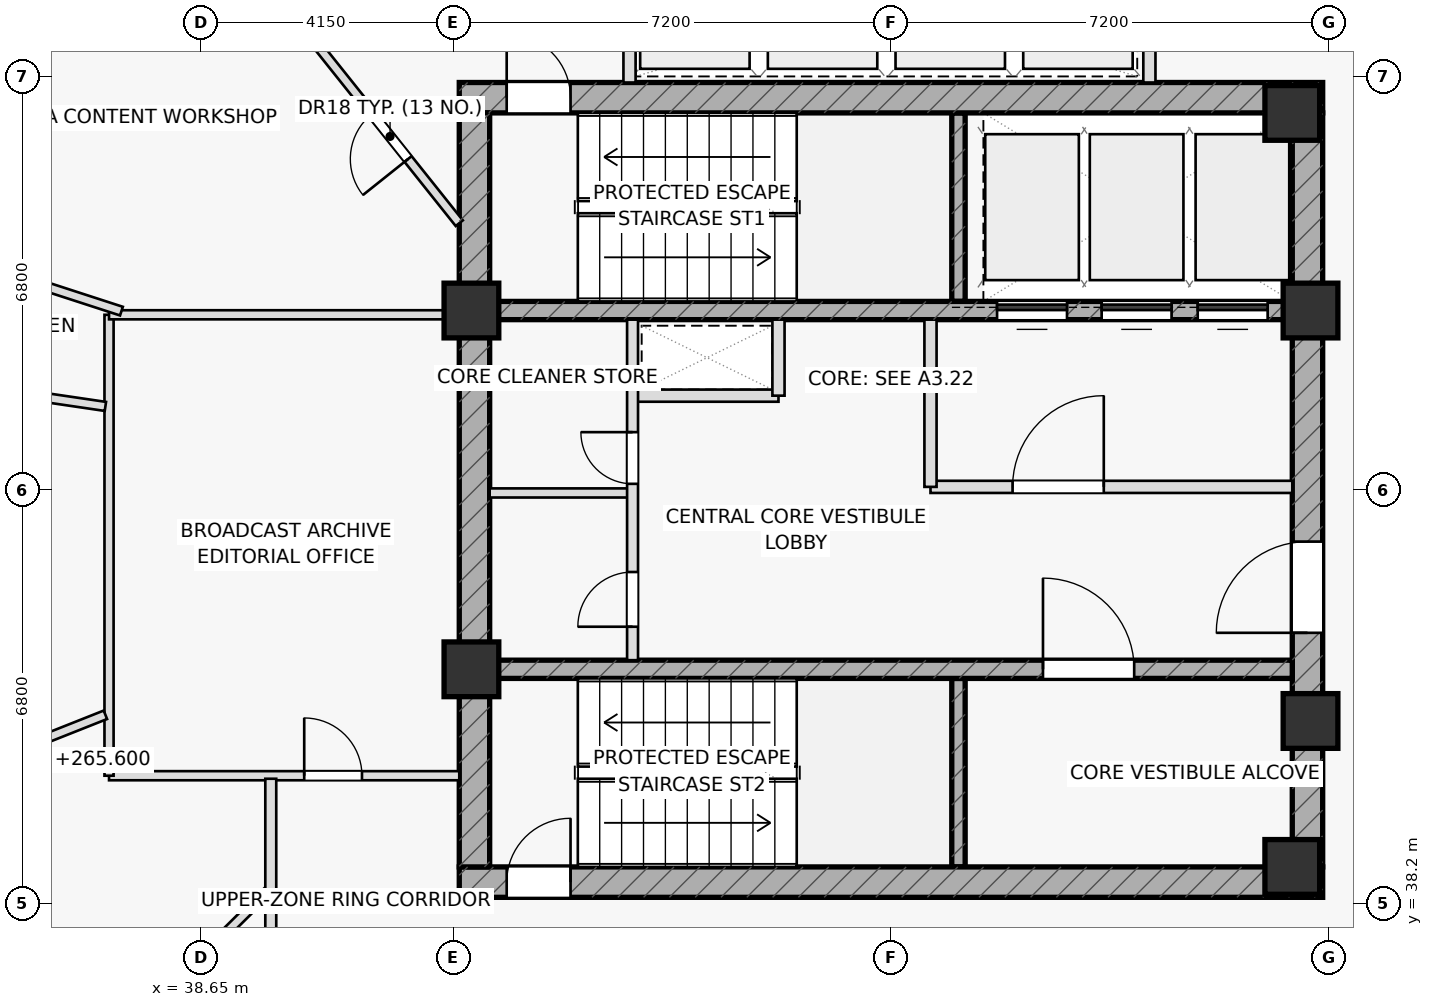
"""IFC4 building model, lengths in metres.
Left out: names, types, materials, properties, quantities, classifications, styles, units other than length and angle.
Written with IfcOpenShell. Run it as: python <this file> out.ifc"""

import sys

from ifc_helpers import new_model, si_unit, direction, frame, frame_2d, origin, origin_2d, place, context, subcontext, project, spatial, rectangle, extrude, element, fill, save


model = new_model("IFC4")
c1 = context("Model", 3, precision=1e-05, world=origin(), true_north=direction((0.0, 1.0)))
c2 = subcontext(c1, "Body", "Model", "MODEL_VIEW")
j1 = project(units=[si_unit("LENGTHUNIT", "METRE"), si_unit("PLANEANGLEUNIT", "RADIAN")], contexts=[c1])
p1 = place(None, origin())
s1 = spatial("IfcSite", under=j1, at=p1, CompositionType="ELEMENT")
p2 = place(p1, origin())
s2 = spatial("IfcBuilding", under=s1, at=p2, CompositionType="ELEMENT")
p3 = place(p2, frame((0.0, 0.0, 265.6)))
s3 = spatial("IfcBuildingStorey", under=s2, at=p3, CompositionType="ELEMENT", Elevation=265.6)
for number, where, z_axis, x_axis in (
    (1, (51.11, 48.1, 0.0), (0.0, 0.0, 1.0), (0.0, 1.0, 0.0)),
    (2, (51.11, 38.8, 0.0), (0.0, 0.0, 1.0), (0.0, 1.0, 0.0)),
):
    element("IfcWall", number, at=place(p3, frame(where, z_axis=z_axis, x_axis=x_axis)), inside=s3, PredefinedType="SHEAR", context=c2, shape_type="SweptSolid", body=[
        extrude(rectangle(XDim=3.1, YDim=0.22, at=frame_2d((1.55, 0.0))), origin(), (0.0, 0.0, 1.0), 3.65),
    ])
p4 = place(p3, frame((42.9, 51.45, 0.0), z_axis=(0.0, 0.0, 1.0), x_axis=(1.0, 0.0, 0.0)))
e3 = element("IfcWall", 3, at=p4, inside=s3, PredefinedType="SHEAR", context=c2, shape_type="SweptSolid", body=[
    extrude(rectangle(XDim=14.2, YDim=0.5, at=frame_2d((7.1, 0.0))), origin(), (0.0, 0.0, 1.0), 3.65),
])
p5 = place(p4, frame((0.78, 0.0, 0.0)))
e4 = element("IfcOpeningElement", 4, at=p5, cuts=e3, PredefinedType="OPENING", context=c2, shape_type="SweptSolid", body=[
    extrude(rectangle(XDim=1.05, YDim=2.2, at=frame_2d((0.525, 1.1))), frame((0.0, 0.26, 0.0), z_axis=(0.0, -1.0, 0.0), x_axis=(1.0, 0.0, 0.0)), (0.0, 0.0, 1.0), 0.52),
])
p6 = place(p3, frame((42.9, 38.55, 0.0), z_axis=(0.0, 0.0, 1.0), x_axis=(1.0, 0.0, 0.0)))
e5 = element("IfcWall", 5, at=p6, inside=s3, PredefinedType="SHEAR", context=c2, shape_type="SweptSolid", body=[
    extrude(rectangle(XDim=14.2, YDim=0.5, at=frame_2d((7.1, 0.0))), origin(), (0.0, 0.0, 1.0), 3.65),
])
p7 = place(p6, frame((0.78, 0.0, 0.0)))
e6 = element("IfcOpeningElement", 6, at=p7, cuts=e5, PredefinedType="OPENING", context=c2, shape_type="SweptSolid", body=[
    extrude(rectangle(XDim=1.05, YDim=2.2, at=frame_2d((0.525, 1.1))), frame((0.0, 0.26, 0.0), z_axis=(0.0, -1.0, 0.0), x_axis=(1.0, 0.0, 0.0)), (0.0, 0.0, 1.0), 0.52),
])
p8 = place(p3, frame((43.15, 38.8, 0.0), z_axis=(0.0, 0.0, 1.0), x_axis=(0.0, 1.0, 0.0)))
e7 = element("IfcWall", 7, at=p8, inside=s3, PredefinedType="SHEAR", context=c2, shape_type="SweptSolid", body=[
    extrude(rectangle(XDim=12.4, YDim=0.5, at=frame_2d((6.2, 0.0))), origin(), (0.0, 0.0, 1.0), 3.65),
])
p9 = place(p3, frame((56.85, 38.8, 0.0), z_axis=(0.0, 0.0, 1.0), x_axis=(0.0, 1.0, 0.0)))
e8 = element("IfcWall", 8, at=p9, inside=s3, PredefinedType="SHEAR", context=c2, shape_type="SweptSolid", body=[
    extrude(rectangle(XDim=12.4, YDim=0.5, at=frame_2d((6.2, 0.0))), origin(), (0.0, 0.0, 1.0), 3.65),
])
p10 = place(p9, frame((3.85, 0.0, 0.0)))
e9 = element("IfcOpeningElement", 9, at=p10, cuts=e8, PredefinedType="OPENING", context=c2, shape_type="SweptSolid", body=[
    extrude(rectangle(XDim=1.5, YDim=2.2, at=frame_2d((0.75, 1.1))), frame((0.0, 0.26, 0.0), z_axis=(0.0, -1.0, 0.0), x_axis=(1.0, 0.0, 0.0)), (0.0, 0.0, 1.0), 0.52),
])
p11 = place(p3, frame((43.4, 47.95, 0.0), z_axis=(0.0, 0.0, 1.0), x_axis=(1.0, 0.0, 0.0)))
e10 = element("IfcWall", 10, at=p11, inside=s3, PredefinedType="SHEAR", context=c2, shape_type="SweptSolid", body=[
    extrude(rectangle(XDim=13.2, YDim=0.3, at=frame_2d((6.6, 0.0))), origin(), (0.0, 0.0, 1.0), 3.65),
])
p12 = place(p11, frame((8.345, 0.0, 0.0)))
e11 = element("IfcOpeningElement", 11, at=p12, cuts=e10, PredefinedType="OPENING", context=c2, shape_type="SweptSolid", body=[
    extrude(rectangle(XDim=1.15, YDim=2.2, at=frame_2d((0.575, 1.1))), frame((0.0, 0.16, 0.0), z_axis=(0.0, -1.0, 0.0), x_axis=(1.0, 0.0, 0.0)), (0.0, 0.0, 1.0), 0.32),
])
p13 = place(p11, frame((10.065, 0.0, 0.0)))
e12 = element("IfcOpeningElement", 12, at=p13, cuts=e10, PredefinedType="OPENING", context=c2, shape_type="SweptSolid", body=[
    extrude(rectangle(XDim=1.15, YDim=2.2, at=frame_2d((0.575, 1.1))), frame((0.0, 0.16, 0.0), z_axis=(0.0, -1.0, 0.0), x_axis=(1.0, 0.0, 0.0)), (0.0, 0.0, 1.0), 0.32),
])
p14 = place(p11, frame((11.645, 0.0, 0.0)))
e13 = element("IfcOpeningElement", 13, at=p14, cuts=e10, PredefinedType="OPENING", context=c2, shape_type="SweptSolid", body=[
    extrude(rectangle(XDim=1.15, YDim=2.2, at=frame_2d((0.575, 1.1))), frame((0.0, 0.16, 0.0), z_axis=(0.0, -1.0, 0.0), x_axis=(1.0, 0.0, 0.0)), (0.0, 0.0, 1.0), 0.32),
])
p15 = place(p3, frame((43.4, 42.05, 0.0), z_axis=(0.0, 0.0, 1.0), x_axis=(1.0, 0.0, 0.0)))
e14 = element("IfcWall", 14, at=p15, inside=s3, PredefinedType="SHEAR", context=c2, shape_type="SweptSolid", body=[
    extrude(rectangle(XDim=13.2, YDim=0.3, at=frame_2d((6.6, 0.0))), origin(), (0.0, 0.0, 1.0), 3.65),
])
p16 = place(p15, frame((9.1, 0.0, 0.0)))
e15 = element("IfcOpeningElement", 15, at=p16, cuts=e14, PredefinedType="OPENING", context=c2, shape_type="SweptSolid", body=[
    extrude(rectangle(XDim=1.5, YDim=2.2, at=frame_2d((0.75, 1.1))), frame((0.0, 0.16, 0.0), z_axis=(0.0, -1.0, 0.0), x_axis=(1.0, 0.0, 0.0)), (0.0, 0.0, 1.0), 0.32),
])
for number, where, z_axis, x_axis in (
    (16, (43.1, 47.95, 0.0), (0.0, 0.0, 1.0), (1.0, 0.0, 0.0)),
    (17, (56.9, 47.95, 0.0), (0.0, 0.0, 1.0), (1.0, 0.0, 0.0)),
    (18, (56.6, 51.2, 0.0), (0.0, 0.0, 1.0), (1.0, 0.0, 0.0)),
    (19, (43.1, 42.05, 0.0), (0.0, 0.0, 1.0), (1.0, 0.0, 0.0)),
    (20, (56.9, 41.2, 0.0), (0.0, 0.0, 1.0), (1.0, 0.0, 0.0)),
    (21, (56.6, 38.8, 0.0), (0.0, 0.0, 1.0), (1.0, 0.0, 0.0)),
):
    element("IfcColumn", number, at=place(p3, frame(where, z_axis=z_axis, x_axis=x_axis)), inside=s3, PredefinedType="COLUMN", context=c2, shape_type="SweptSolid", body=[
        extrude(rectangle(XDim=0.9, YDim=0.9, at=origin_2d()), origin(), (0.0, 0.0, 1.0), 3.65),
    ])
for number, where, z_axis, x_axis in (
    (22, (45.7, 51.7, 0.0), (0.0, 0.0, 1.0), (0.0, 1.0, 0.0)),
    (23, (54.25, 51.7, 0.0), (0.0, 0.0, 1.0), (0.0, 1.0, 0.0)),
):
    element("IfcWall", number, at=place(p3, frame(where, z_axis=z_axis, x_axis=x_axis)), inside=s3, PredefinedType="PARTITIONING", context=c2, shape_type="SweptSolid", body=[
        extrude(rectangle(XDim=2.6, YDim=0.2, at=frame_2d((1.3, 0.0))), origin(), (0.0, 0.0, 1.0), 3.65),
    ])
p17 = place(p3, frame((45.75, 46.55, 0.0), z_axis=(0.0, 0.0, 1.0), x_axis=(1.0, 0.0, 0.0)))
e24 = element("IfcWall", 24, at=p17, inside=s3, PredefinedType="PARTITIONING", context=c2, shape_type="SweptSolid", body=[
    extrude(rectangle(XDim=2.4, YDim=0.2, at=frame_2d((1.2, 0.0))), origin(), (0.0, 0.0, 1.0), 3.65),
])
p18 = place(p3, frame((48.15, 46.55, 0.0), z_axis=(0.0, 0.0, 1.0), x_axis=(0.0, 1.0, 0.0)))
e25 = element("IfcWall", 25, at=p18, inside=s3, PredefinedType="PARTITIONING", context=c2, shape_type="SweptSolid", body=[
    extrude(rectangle(XDim=1.25, YDim=0.2, at=frame_2d((0.625, 0.0))), origin(), (0.0, 0.0, 1.0), 3.65),
])
p19 = place(p3, frame((50.65, 45.05, 0.0), z_axis=(0.0, 0.0, 1.0), x_axis=(1.0, 0.0, 0.0)))
e26 = element("IfcWall", 26, at=p19, inside=s3, PredefinedType="PARTITIONING", context=c2, shape_type="SweptSolid", body=[
    extrude(rectangle(XDim=5.95, YDim=0.2, at=frame_2d((2.975, 0.0))), origin(), (0.0, 0.0, 1.0), 3.65),
])
p20 = place(p19, frame((1.35, 0.0, 0.0)))
e27 = element("IfcOpeningElement", 27, at=p20, cuts=e26, PredefinedType="OPENING", context=c2, shape_type="SweptSolid", body=[
    extrude(rectangle(XDim=1.5, YDim=2.2, at=frame_2d((0.75, 1.1))), frame((0.0, 0.11, 0.0), z_axis=(0.0, -1.0, 0.0), x_axis=(1.0, 0.0, 0.0)), (0.0, 0.0, 1.0), 0.22),
])
p21 = place(p3, frame((50.65, 45.05, 0.0), z_axis=(0.0, 0.0, 1.0), x_axis=(0.0, 1.0, 0.0)))
e28 = element("IfcWall", 28, at=p21, inside=s3, PredefinedType="PARTITIONING", context=c2, shape_type="SweptSolid", body=[
    extrude(rectangle(XDim=2.75, YDim=0.2, at=frame_2d((1.375, 0.0))), origin(), (0.0, 0.0, 1.0), 3.65),
])
p22 = place(p3, frame((43.4, 44.95, 0.0), z_axis=(0.0, 0.0, 1.0), x_axis=(1.0, 0.0, 0.0)))
e29 = element("IfcWall", 29, at=p22, inside=s3, PredefinedType="PARTITIONING", context=c2, shape_type="SweptSolid", body=[
    extrude(rectangle(XDim=2.35, YDim=0.15, at=frame_2d((1.175, 0.0))), origin(), (0.0, 0.0, 1.0), 3.65),
])
p23 = place(p3, frame((45.75, 42.2, 0.0), z_axis=(0.0, 0.0, 1.0), x_axis=(0.0, 1.0, 0.0)))
e30 = element("IfcWall", 30, at=p23, inside=s3, PredefinedType="PARTITIONING", context=c2, shape_type="SweptSolid", body=[
    extrude(rectangle(XDim=5.6, YDim=0.18, at=frame_2d((2.8, 0.0))), origin(), (0.0, 0.0, 1.0), 3.65),
])
p24 = place(p23, frame((0.55, 0.0, 0.0)))
e31 = element("IfcOpeningElement", 31, at=p24, cuts=e30, PredefinedType="OPENING", context=c2, shape_type="SweptSolid", body=[
    extrude(rectangle(XDim=0.9, YDim=2.05, at=frame_2d((0.45, 1.025))), frame((0.0, 0.1, 0.0), z_axis=(0.0, -1.0, 0.0), x_axis=(1.0, 0.0, 0.0)), (0.0, 0.0, 1.0), 0.2),
])
p25 = place(p23, frame((2.9, 0.0, 0.0)))
e32 = element("IfcOpeningElement", 32, at=p25, cuts=e30, PredefinedType="OPENING", context=c2, shape_type="SweptSolid", body=[
    extrude(rectangle(XDim=0.85, YDim=2.05, at=frame_2d((0.425, 1.025))), frame((0.0, 0.1, 0.0), z_axis=(0.0, -1.0, 0.0), x_axis=(1.0, 0.0, 0.0)), (0.0, 0.0, 1.0), 0.2),
])
p26 = place(p3, frame((37.14, 40.3, 0.0), z_axis=(0.0, 0.0, 1.0), x_axis=(1.0, 0.0, 0.0)))
e33 = element("IfcWall", 33, at=p26, inside=s3, PredefinedType="PARTITIONING", context=c2, shape_type="SweptSolid", body=[
    extrude(rectangle(XDim=5.76, YDim=0.15, at=frame_2d((2.88, 0.0))), origin(), (0.0, 0.0, 1.0), 3.075),
])
p27 = place(p26, frame((3.21, 0.0, 0.0)))
e34 = element("IfcOpeningElement", 34, at=p27, cuts=e33, PredefinedType="OPENING", context=c2, shape_type="SweptSolid", body=[
    extrude(rectangle(XDim=0.95, YDim=2.05, at=frame_2d((0.475, 1.025))), frame((0.0, 0.085, 0.0), z_axis=(0.0, -1.0, 0.0), x_axis=(1.0, 0.0, 0.0)), (0.0, 0.0, 1.0), 0.17),
])
p28 = place(p3, frame((37.14, 40.3, 0.0), z_axis=(0.0, 0.0, 1.0), x_axis=(0.0, 1.0, 0.0)))
e35 = element("IfcWall", 35, at=p28, inside=s3, PredefinedType="PARTITIONING", context=c2, shape_type="SweptSolid", body=[
    extrude(rectangle(XDim=7.58, YDim=0.15, at=frame_2d((3.79, 0.0))), origin(), (0.0, 0.0, 1.0), 3.65),
])
p29 = place(p3, frame((37.14, 47.88, 0.0), z_axis=(0.0, 0.0, 1.0), x_axis=(1.0, 0.0, 0.0)))
e36 = element("IfcWall", 36, at=p29, inside=s3, PredefinedType="PARTITIONING", context=c2, shape_type="SweptSolid", body=[
    extrude(rectangle(XDim=5.76, YDim=0.15, at=frame_2d((2.88, 0.0))), origin(), (0.0, 0.0, 1.0), 3.075),
])
p30 = place(p3, frame((42.9, 49.386, 0.0), z_axis=(0.0, 0.0, 1.0), x_axis=(-0.623691664513, 0.781670459731, 0.0)))
e37 = element("IfcWall", 37, at=p30, inside=s3, PredefinedType="PARTITIONING", context=c2, shape_type="SweptSolid", body=[
    extrude(rectangle(XDim=17.902, YDim=0.15, at=frame_2d((8.951, 0.0))), origin(), (0.0, 0.0, 1.0), 3.075),
])
p31 = place(p30, frame((1.35, 0.0, 0.0)))
e38 = element("IfcOpeningElement", 38, at=p31, cuts=e37, PredefinedType="OPENING", context=c2, shape_type="SweptSolid", body=[
    extrude(rectangle(XDim=0.95, YDim=2.05, at=frame_2d((0.475, 1.025))), frame((0.0, 0.085, 0.0), z_axis=(0.0, -1.0, 0.0), x_axis=(1.0, 0.0, 0.0)), (0.0, 0.0, 1.0), 0.17),
])
p32 = place(p3, frame((37.344, 47.94, 0.0), z_axis=(0.0, 0.0, 1.0), x_axis=(-0.951128986238, 0.30879386577, 0.0)))
e39 = element("IfcWall", 39, at=p32, inside=s3, PredefinedType="PARTITIONING", context=c2, shape_type="SweptSolid", body=[
    extrude(rectangle(XDim=13.131, YDim=0.15, at=frame_2d((6.565, 0.0))), origin(), (0.0, 0.0, 1.0), 3.175),
])
p33 = place(p3, frame((37.08, 46.373, 0.0), z_axis=(0.0, 0.0, 1.0), x_axis=(-0.989323166156, 0.145738371431, 0.0)))
e40 = element("IfcWall", 40, at=p33, inside=s3, PredefinedType="PARTITIONING", context=c2, shape_type="SweptSolid", body=[
    extrude(rectangle(XDim=11.619, YDim=0.15, at=frame_2d((5.81, 0.0))), origin(), (0.0, 0.0, 1.0), 3.075),
])
p34 = place(p33, frame((3.15, 0.0, 0.0)))
e41 = element("IfcOpeningElement", 41, at=p34, cuts=e40, PredefinedType="OPENING", context=c2, shape_type="SweptSolid", body=[
    extrude(rectangle(XDim=0.95, YDim=2.05, at=frame_2d((0.475, 1.025))), frame((0.0, 0.085, 0.0), z_axis=(0.0, -1.0, 0.0), x_axis=(1.0, 0.0, 0.0)), (0.0, 0.0, 1.0), 0.17),
])
p35 = place(p3, frame((37.08, 41.302, 0.0), z_axis=(0.0, 0.0, 1.0), x_axis=(-0.929502291, -0.368816337797, 0.0)))
e42 = element("IfcWall", 42, at=p35, inside=s3, PredefinedType="PARTITIONING", context=c2, shape_type="SweptSolid", body=[
    extrude(rectangle(XDim=9.063, YDim=0.15, at=frame_2d((4.532, 0.0))), origin(), (0.0, 0.0, 1.0), 3.075),
])
p36 = place(p35, frame((2.55, 0.0, 0.0)))
e43 = element("IfcOpeningElement", 43, at=p36, cuts=e42, PredefinedType="OPENING", context=c2, shape_type="SweptSolid", body=[
    extrude(rectangle(XDim=0.95, YDim=2.05, at=frame_2d((0.475, 1.025))), frame((0.0, 0.085, 0.0), z_axis=(0.0, -1.0, 0.0), x_axis=(1.0, 0.0, 0.0)), (0.0, 0.0, 1.0), 0.17),
])
p37 = place(p3, frame((39.8, 38.45, 0.0), z_axis=(0.0, 0.0, 1.0), x_axis=(-0.709811227193, -0.704391951793, 0.0)))
e44 = element("IfcWall", 44, at=p37, inside=s3, PredefinedType="PARTITIONING", context=c2, shape_type="SweptSolid", body=[
    extrude(rectangle(XDim=10.722, YDim=0.15, at=frame_2d((5.361, 0.0))), origin(), (0.0, 0.0, 1.0), 3.075),
])
p38 = place(p37, frame((1.35, 0.0, 0.0)))
e45 = element("IfcOpeningElement", 45, at=p38, cuts=e44, PredefinedType="OPENING", context=c2, shape_type="SweptSolid", body=[
    extrude(rectangle(XDim=0.95, YDim=2.05, at=frame_2d((0.475, 1.025))), frame((0.0, 0.085, 0.0), z_axis=(0.0, -1.0, 0.0), x_axis=(1.0, 0.0, 0.0)), (0.0, 0.0, 1.0), 0.17),
])
p39 = place(p3, frame((39.8, 36.17, 0.0), z_axis=(0.0, 0.0, 1.0), x_axis=(0.0, 1.0, 0.0)))
e46 = element("IfcWall", 46, at=p39, inside=s3, PredefinedType="PARTITIONING", context=c2, shape_type="SweptSolid", body=[
    extrude(rectangle(XDim=4.08, YDim=0.18, at=frame_2d((2.04, 0.0))), origin(), (0.0, 0.0, 1.0), 3.355),
])
p40 = place(p5, origin())
e47 = element("IfcDoor", 47, at=p40, inside=s3, OperationType="SINGLE_SWING_LEFT", PredefinedType="DOOR", context=c2, shape_type="SweptSolid", body=[
    extrude(rectangle(XDim=1.05, YDim=2.2, at=frame_2d((0.525, 1.1))), frame((0.0, 0.025, 0.0), z_axis=(0.0, -1.0, 0.0), x_axis=(1.0, 0.0, 0.0)), (0.0, 0.0, 1.0), 0.05),
])
fill(e4, e47)
p41 = place(p7, origin())
e48 = element("IfcDoor", 48, at=p41, inside=s3, OperationType="SINGLE_SWING_RIGHT", PredefinedType="DOOR", context=c2, shape_type="SweptSolid", body=[
    extrude(rectangle(XDim=1.05, YDim=2.2, at=frame_2d((0.525, 1.1))), frame((0.0, 0.025, 0.0), z_axis=(0.0, -1.0, 0.0), x_axis=(1.0, 0.0, 0.0)), (0.0, 0.0, 1.0), 0.05),
])
fill(e6, e48)
p42 = place(p10, origin())
e49 = element("IfcDoor", 49, at=p42, inside=s3, OperationType="SINGLE_SWING_LEFT", PredefinedType="DOOR", context=c2, shape_type="SweptSolid", body=[
    extrude(rectangle(XDim=1.5, YDim=2.2, at=frame_2d((0.75, 1.1))), frame((0.0, 0.025, 0.0), z_axis=(0.0, -1.0, 0.0), x_axis=(1.0, 0.0, 0.0)), (0.0, 0.0, 1.0), 0.05),
])
fill(e9, e49)
p43 = place(p20, origin())
e50 = element("IfcDoor", 50, at=p43, inside=s3, OperationType="SINGLE_SWING_RIGHT", PredefinedType="DOOR", context=c2, shape_type="SweptSolid", body=[
    extrude(rectangle(XDim=1.5, YDim=2.2, at=frame_2d((0.75, 1.1))), frame((0.0, 0.025, 0.0), z_axis=(0.0, -1.0, 0.0), x_axis=(1.0, 0.0, 0.0)), (0.0, 0.0, 1.0), 0.05),
])
fill(e27, e50)
p44 = place(p16, origin())
e51 = element("IfcDoor", 51, at=p44, inside=s3, OperationType="SINGLE_SWING_LEFT", PredefinedType="DOOR", context=c2, shape_type="SweptSolid", body=[
    extrude(rectangle(XDim=1.5, YDim=2.2, at=frame_2d((0.75, 1.1))), frame((0.0, 0.025, 0.0), z_axis=(0.0, -1.0, 0.0), x_axis=(1.0, 0.0, 0.0)), (0.0, 0.0, 1.0), 0.05),
])
fill(e15, e51)
p45 = place(p24, origin())
e52 = element("IfcDoor", 52, at=p45, inside=s3, OperationType="SINGLE_SWING_LEFT", PredefinedType="DOOR", context=c2, shape_type="SweptSolid", body=[
    extrude(rectangle(XDim=0.9, YDim=2.05, at=frame_2d((0.45, 1.025))), frame((0.0, 0.025, 0.0), z_axis=(0.0, -1.0, 0.0), x_axis=(1.0, 0.0, 0.0)), (0.0, 0.0, 1.0), 0.05),
])
fill(e31, e52)
p46 = place(p25, origin())
e53 = element("IfcDoor", 53, at=p46, inside=s3, OperationType="SINGLE_SWING_RIGHT", PredefinedType="DOOR", context=c2, shape_type="SweptSolid", body=[
    extrude(rectangle(XDim=0.85, YDim=2.05, at=frame_2d((0.425, 1.025))), frame((0.0, 0.025, 0.0), z_axis=(0.0, -1.0, 0.0), x_axis=(1.0, 0.0, 0.0)), (0.0, 0.0, 1.0), 0.05),
])
fill(e32, e53)
p47 = place(p27, origin())
e54 = element("IfcDoor", 54, at=p47, inside=s3, OperationType="SINGLE_SWING_LEFT", PredefinedType="DOOR", context=c2, shape_type="SweptSolid", body=[
    extrude(rectangle(XDim=0.95, YDim=2.05, at=frame_2d((0.475, 1.025))), frame((0.0, 0.025, 0.0), z_axis=(0.0, -1.0, 0.0), x_axis=(1.0, 0.0, 0.0)), (0.0, 0.0, 1.0), 0.05),
])
fill(e34, e54)
p48 = place(p31, origin())
e55 = element("IfcDoor", 55, at=p48, inside=s3, OperationType="SINGLE_SWING_LEFT", PredefinedType="DOOR", context=c2, shape_type="SweptSolid", body=[
    extrude(rectangle(XDim=0.95, YDim=2.05, at=frame_2d((0.475, 1.025))), frame((0.0, 0.025, 0.0), z_axis=(0.0, -1.0, 0.0), x_axis=(1.0, 0.0, 0.0)), (0.0, 0.0, 1.0), 0.05),
])
fill(e38, e55)
p49 = place(p12, origin())
e56 = element("IfcDoor", 56, at=p49, inside=s3, OperationType="SLIDING_TO_LEFT", PredefinedType="DOOR", context=c2, shape_type="SweptSolid", body=[
    extrude(rectangle(XDim=1.15, YDim=2.2, at=frame_2d((0.575, 1.1))), frame((0.0, 0.025, 0.0), z_axis=(0.0, -1.0, 0.0), x_axis=(1.0, 0.0, 0.0)), (0.0, 0.0, 1.0), 0.05),
])
fill(e11, e56)
p50 = place(p13, origin())
e57 = element("IfcDoor", 57, at=p50, inside=s3, OperationType="SLIDING_TO_LEFT", PredefinedType="DOOR", context=c2, shape_type="SweptSolid", body=[
    extrude(rectangle(XDim=1.15, YDim=2.2, at=frame_2d((0.575, 1.1))), frame((0.0, 0.025, 0.0), z_axis=(0.0, -1.0, 0.0), x_axis=(1.0, 0.0, 0.0)), (0.0, 0.0, 1.0), 0.05),
])
fill(e12, e57)
p51 = place(p14, origin())
e58 = element("IfcDoor", 58, at=p51, inside=s3, OperationType="SLIDING_TO_LEFT", PredefinedType="DOOR", context=c2, shape_type="SweptSolid", body=[
    extrude(rectangle(XDim=1.15, YDim=2.2, at=frame_2d((0.575, 1.1))), frame((0.0, 0.025, 0.0), z_axis=(0.0, -1.0, 0.0), x_axis=(1.0, 0.0, 0.0)), (0.0, 0.0, 1.0), 0.05),
])
fill(e13, e58)
save(model, sys.argv[1])
